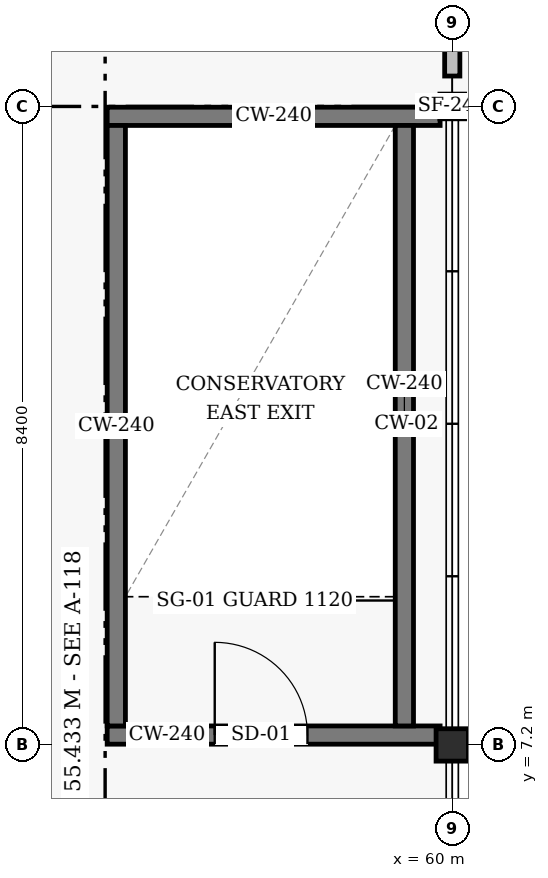
"""IFC4 building model, lengths in metres.
Left out: names, types, materials, properties, quantities, classifications, styles, units other than length and angle.
Written with IfcOpenShell. Run it as: python <this file> out.ifc"""

import sys

from ifc_helpers import new_model, si_unit, direction, frame, frame_2d, origin, origin_2d, place, context, subcontext, project, spatial, rectangle, hollow_circle, extrude, element, fill, save


model = new_model("IFC4")
c1 = context("Model", 3, precision=1e-05, world=origin(), true_north=direction((0.0, 1.0)))
c2 = subcontext(c1, "Body", "Model", "MODEL_VIEW")
j1 = project(units=[si_unit("LENGTHUNIT", "METRE"), si_unit("PLANEANGLEUNIT", "RADIAN")], contexts=[c1])
p1 = place(None, origin())
s1 = spatial("IfcSite", under=j1, at=p1, CompositionType="ELEMENT")
p2 = place(p1, origin())
s2 = spatial("IfcBuilding", under=s1, at=p2, CompositionType="ELEMENT")
p3 = place(p2, frame((0.0, 0.0, 4.8)))
s3 = spatial("IfcBuildingStorey", under=s2, at=p3, CompositionType="ELEMENT", Elevation=4.8)
p4 = place(p3, frame((60.0, 7.2, 0.0), z_axis=(0.0, 0.0, 1.0), x_axis=(1.0, 0.0, 0.0)))
e1 = element("IfcColumn", 1, at=p4, inside=s3, PredefinedType="COLUMN", context=c2, shape_type="SweptSolid", body=[
    extrude(hollow_circle(Radius=0.213, WallThickness=0.014, at=origin_2d()), origin(), (0.0, 0.0, 1.0), 4.176),
])
p5 = place(p3, frame((60.0, 15.6, 0.0), z_axis=(0.0, 0.0, 1.0), x_axis=(1.0, 0.0, 0.0)))
e2 = element("IfcColumn", 2, at=p5, inside=s3, PredefinedType="COLUMN", context=c2, shape_type="SweptSolid", body=[
    extrude(hollow_circle(Radius=0.163, WallThickness=0.012, at=origin_2d()), origin(), (0.0, 0.0, 1.0), 4.176),
])
p6 = place(p3, frame((55.46, 7.33, 0.0), z_axis=(0.0, 0.0, 1.0), x_axis=(1.0, 0.0, 0.0)))
e3 = element("IfcWall", 3, at=p6, inside=s3, PredefinedType="SHEAR", context=c2, shape_type="SweptSolid", body=[
    extrude(rectangle(XDim=4.38, YDim=0.24, at=frame_2d((2.19, 0.0))), origin(), (0.0, 0.0, 1.0), 3.955),
])
p7 = place(p6, frame((1.415, 0.0, 0.0)))
e4 = element("IfcOpeningElement", 4, at=p7, cuts=e3, PredefinedType="OPENING", context=c2, shape_type="SweptSolid", body=[
    extrude(rectangle(XDim=1.22, YDim=2.18, at=frame_2d((0.61, 1.09))), frame((0.0, 0.13, 0.0), z_axis=(0.0, -1.0, 0.0), x_axis=(1.0, 0.0, 0.0)), (0.0, 0.0, 1.0), 0.26),
])
p8 = place(p3, frame((55.46, 15.47, 0.0), z_axis=(0.0, 0.0, 1.0), x_axis=(1.0, 0.0, 0.0)))
e5 = element("IfcWall", 5, at=p8, inside=s3, PredefinedType="SHEAR", context=c2, shape_type="SweptSolid", body=[
    extrude(rectangle(XDim=4.38, YDim=0.24, at=frame_2d((2.19, 0.0))), origin(), (0.0, 0.0, 1.0), 3.955),
])
for number, where, z_axis, x_axis in (
    (6, (55.58, 7.45, 0.0), (0.0, 0.0, 1.0), (0.0, 1.0, 0.0)),
    (7, (59.37, 7.45, 0.0), (0.0, 0.0, 1.0), (0.0, 1.0, 0.0)),
):
    element("IfcWall", number, at=place(p3, frame(where, z_axis=z_axis, x_axis=x_axis)), inside=s3, PredefinedType="SHEAR", context=c2, shape_type="SweptSolid", body=[
        extrude(rectangle(XDim=7.9, YDim=0.24, at=frame_2d((3.95, 0.0))), origin(), (0.0, 0.0, 1.0), 3.955),
    ])
p9 = place(p3, frame((60.0, 16.0, 0.0), z_axis=(0.0, 0.0, 1.0), x_axis=(0.0, 1.0, 0.0)))
e8 = element("IfcWall", 8, at=p9, inside=s3, PredefinedType="SOLIDWALL", context=c2, shape_type="SweptSolid", body=[
    extrude(rectangle(XDim=15.0, YDim=0.2, at=frame_2d((7.5, 0.0))), origin(), (0.0, 0.0, 1.0), 3.7),
])
p10 = place(p9, frame((5.168, 0.0, 0.0)))
e9 = element("IfcOpeningElement", 9, at=p10, cuts=e8, PredefinedType="OPENING", context=c2, shape_type="SweptSolid", body=[
    extrude(rectangle(XDim=1.42, YDim=2.18, at=frame_2d((0.71, 1.09))), frame((0.0, 0.11, 0.0), z_axis=(0.0, -1.0, 0.0), x_axis=(1.0, 0.0, 0.0)), (0.0, 0.0, 1.0), 0.22),
])
p11 = place(p7, origin())
e10 = element("IfcDoor", 10, at=p11, inside=s3, OperationType="SINGLE_SWING_LEFT", PredefinedType="DOOR", context=c2, shape_type="SweptSolid", body=[
    extrude(rectangle(XDim=1.22, YDim=2.18, at=frame_2d((0.61, 1.09))), frame((0.0, 0.025, 0.0), z_axis=(0.0, -1.0, 0.0), x_axis=(1.0, 0.0, 0.0)), (0.0, 0.0, 1.0), 0.05),
])
fill(e4, e10)
save(model, sys.argv[1])
